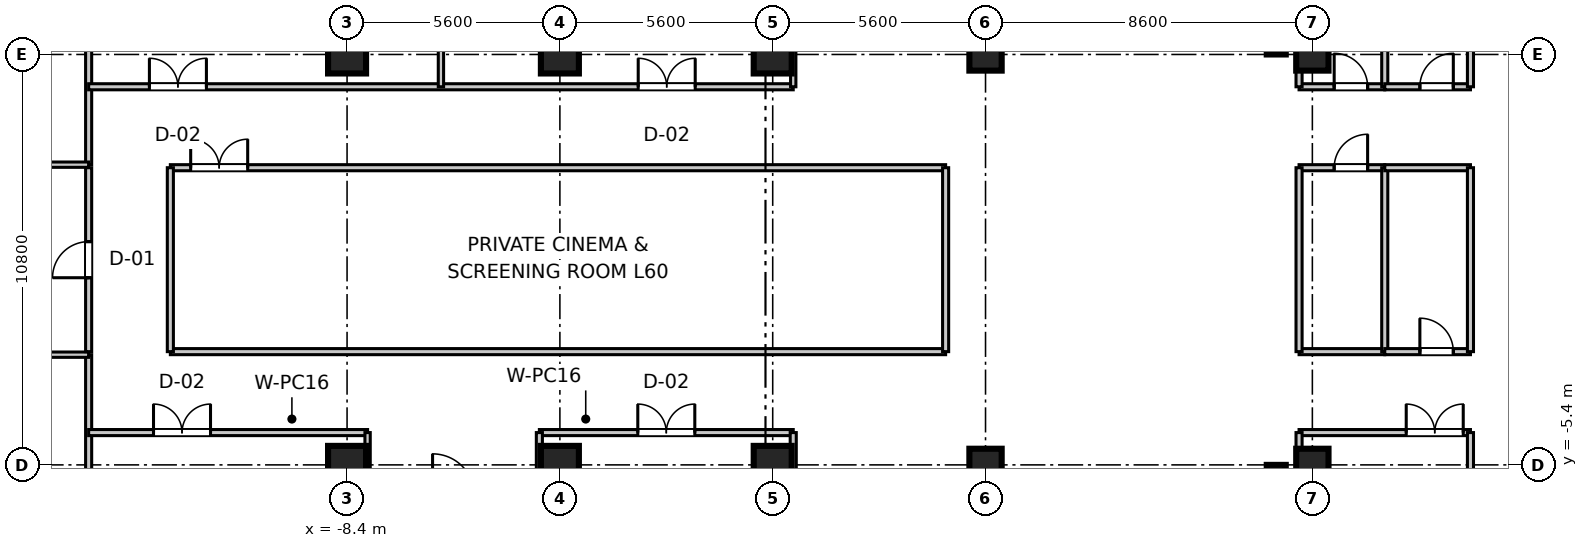
"""IFC4 building model, lengths in metres.
Left out: names, types, materials, properties, quantities, classifications, styles, units other than length and angle.
Written with IfcOpenShell. Run it as: python <this file> out.ifc"""

import sys

from ifc_helpers import new_model, si_unit, direction, frame, frame_2d, origin, origin_2d, place, context, subcontext, project, spatial, rectangle, extrude, source, transform, mapped, element, fill, save


model = new_model("IFC4")
c1 = context("Model", 3, precision=1e-05, world=origin(), true_north=direction((0.0, 1.0)))
c2 = subcontext(c1, "Body", "Model", "MODEL_VIEW")
j1 = project(units=[si_unit("LENGTHUNIT", "METRE"), si_unit("PLANEANGLEUNIT", "RADIAN")], contexts=[c1])
p1 = place(None, origin())
s1 = spatial("IfcSite", under=j1, at=p1, CompositionType="ELEMENT")
p2 = place(p1, origin())
s2 = spatial("IfcBuilding", under=s1, at=p2, CompositionType="ELEMENT")
p3 = place(p2, frame((0.0, 0.0, 234.5)))
s3 = spatial("IfcBuildingStorey", under=s2, at=p3, CompositionType="ELEMENT", Elevation=234.5)
m1 = source(origin(), c2, "Body", "SweptSolid", [
    extrude(rectangle(XDim=1.0, YDim=1.0, at=origin_2d()), origin(), (0.0, 0.0, 1.0), 3.655),
])
for number, where, z_axis, x_axis in (
    (1, (-8.4, -5.4, 0.0), (0.0, 0.0, 1.0), (1.0, 0.0, 0.0)),
    (2, (-8.4, 5.4, 0.0), (0.0, 0.0, 1.0), (1.0, 0.0, 0.0)),
    (3, (-2.8, -5.4, 0.0), (0.0, 0.0, 1.0), (1.0, 0.0, 0.0)),
    (4, (-2.8, 5.4, 0.0), (0.0, 0.0, 1.0), (1.0, 0.0, 0.0)),
    (5, (2.8, -5.4, 0.0), (0.0, 0.0, 1.0), (1.0, 0.0, 0.0)),
    (6, (2.8, 5.4, 0.0), (0.0, 0.0, 1.0), (1.0, 0.0, 0.0)),
):
    element("IfcColumn", number, at=place(p3, frame(where, z_axis=z_axis, x_axis=x_axis)), inside=s3, PredefinedType="COLUMN", context=c2, shape_type="MappedRepresentation", body=[
        mapped(m1, transform((0.0, 0.0, 0.0), scale=1.0)),
    ])
m2 = source(origin(), c2, "Body", "SweptSolid", [
    extrude(rectangle(XDim=0.85, YDim=0.85, at=origin_2d()), origin(), (0.0, 0.0, 1.0), 3.655),
])
for number, where, z_axis, x_axis in (
    (7, (8.4, -5.4, 0.0), (0.0, 0.0, 1.0), (1.0, 0.0, 0.0)),
    (8, (8.4, 5.4, 0.0), (0.0, 0.0, 1.0), (1.0, 0.0, 0.0)),
    (9, (17.0, -5.4, 0.0), (0.0, 0.0, 1.0), (1.0, 0.0, 0.0)),
    (10, (17.0, 5.4, 0.0), (0.0, 0.0, 1.0), (1.0, 0.0, 0.0)),
):
    element("IfcColumn", number, at=place(p3, frame(where, z_axis=z_axis, x_axis=x_axis)), inside=s3, PredefinedType="PILASTER", context=c2, shape_type="MappedRepresentation", body=[
        mapped(m2, transform((0.0, 0.0, 0.0), scale=1.0)),
    ])
m3 = source(origin(), c2, "Body", "SweptSolid", [
    extrude(rectangle(XDim=11.6, YDim=0.5, at=frame_2d((5.8, 0.0))), origin(), (0.0, 0.0, 1.0), 3.41),
])
for number, where, z_axis, x_axis in (
    (11, (16.05, 5.4, 0.0), (0.0, 0.0, 1.0), (0.0, 1.0, 0.0)),
    (12, (16.05, -17.0, 0.0), (0.0, 0.0, 1.0), (0.0, 1.0, 0.0)),
):
    element("IfcWall", number, at=place(p3, frame(where, z_axis=z_axis, x_axis=x_axis)), inside=s3, PredefinedType="SHEAR", context=c2, shape_type="MappedRepresentation", body=[
        mapped(m3, transform((0.0, 0.0, 0.0), scale=1.0)),
    ])
m4 = source(origin(), c2, "Body", "SweptSolid", [
    extrude(rectangle(XDim=2.255, YDim=0.16, at=frame_2d((1.127, 0.0))), origin(), (0.0, 0.0, 1.0), 2.75),
])
p4 = place(p3, frame((16.65, 4.55, 0.0), z_axis=(0.0, 0.0, 1.0), x_axis=(1.0, 0.0, 0.0)))
e13 = element("IfcWall", 13, at=p4, inside=s3, PredefinedType="PARTITIONING", context=c2, shape_type="MappedRepresentation", body=[
    mapped(m4, transform((0.0, 0.0, 0.0), scale=1.0)),
])
p5 = place(p4, frame((0.924, 0.0, 0.0)))
e14 = element("IfcOpeningElement", 14, at=p5, cuts=e13, PredefinedType="OPENING", context=c2, shape_type="SweptSolid", body=[
    extrude(rectangle(XDim=0.88, YDim=2.1, at=frame_2d((0.44, 1.05))), frame((0.0, 0.09, 0.0), z_axis=(0.0, -1.0, 0.0), x_axis=(1.0, 0.0, 0.0)), (0.0, 0.0, 1.0), 0.18),
])
m5 = source(origin(), c2, "Body", "SweptSolid", [
    extrude(rectangle(XDim=19.35, YDim=0.16, at=frame_2d((9.675, 0.0))), origin(), (0.0, 0.0, 1.0), 2.75),
])
for number, where, z_axis, x_axis in (
    (15, (16.65, 4.55, 0.0), (0.0, 0.0, 1.0), (0.0, 1.0, 0.0)),
    (16, (18.905, 4.55, 0.0), (0.0, 0.0, 1.0), (0.0, 1.0, 0.0)),
):
    element("IfcWall", number, at=place(p3, frame(where, z_axis=z_axis, x_axis=x_axis)), inside=s3, PredefinedType="PARTITIONING", context=c2, shape_type="MappedRepresentation", body=[
        mapped(m5, transform((0.0, 0.0, 0.0), scale=1.0)),
    ])
m6 = source(origin(), c2, "Body", "SweptSolid", [
    extrude(rectangle(XDim=2.255, YDim=0.16, at=frame_2d((1.127, 0.0))), origin(), (0.0, 0.0, 1.0), 2.75),
])
p6 = place(p3, frame((18.905, 4.55, 0.0), z_axis=(0.0, 0.0, 1.0), x_axis=(1.0, 0.0, 0.0)))
e17 = element("IfcWall", 17, at=p6, inside=s3, PredefinedType="PARTITIONING", context=c2, shape_type="MappedRepresentation", body=[
    mapped(m6, transform((0.0, 0.0, 0.0), scale=1.0)),
])
p7 = place(p6, frame((0.924, 0.0, 0.0)))
e18 = element("IfcOpeningElement", 18, at=p7, cuts=e17, PredefinedType="OPENING", context=c2, shape_type="SweptSolid", body=[
    extrude(rectangle(XDim=0.88, YDim=2.1, at=frame_2d((0.44, 1.05))), frame((0.0, 0.09, 0.0), z_axis=(0.0, -1.0, 0.0), x_axis=(1.0, 0.0, 0.0)), (0.0, 0.0, 1.0), 0.18),
])
m7 = source(origin(), c2, "Body", "SweptSolid", [
    extrude(rectangle(XDim=17.93, YDim=0.16, at=frame_2d((8.965, 0.0))), origin(), (0.0, 0.0, 1.0), 2.75),
])
p8 = place(p3, frame((21.16, 4.55, 0.0), z_axis=(0.0, 0.0, 1.0), x_axis=(0.0, 1.0, 0.0)))
e19 = element("IfcWall", 19, at=p8, inside=s3, PredefinedType="PARTITIONING", context=c2, shape_type="MappedRepresentation", body=[
    mapped(m7, transform((0.0, 0.0, 0.0), scale=1.0)),
])
m8 = source(origin(), c2, "Body", "SweptSolid", [
    extrude(rectangle(XDim=4.51, YDim=0.16, at=frame_2d((2.255, 0.0))), origin(), (0.0, 0.0, 1.0), 2.75),
])
p9 = place(p3, frame((16.65, -4.55, 0.0), z_axis=(0.0, 0.0, 1.0), x_axis=(1.0, 0.0, 0.0)))
e20 = element("IfcWall", 20, at=p9, inside=s3, PredefinedType="PARTITIONING", context=c2, shape_type="MappedRepresentation", body=[
    mapped(m8, transform((0.0, 0.0, 0.0), scale=1.0)),
])
p10 = place(p9, frame((2.82, 0.0, 0.0)))
e21 = element("IfcOpeningElement", 21, at=p10, cuts=e20, PredefinedType="OPENING", context=c2, shape_type="SweptSolid", body=[
    extrude(rectangle(XDim=1.5, YDim=2.15, at=frame_2d((0.75, 1.075))), frame((0.0, 0.09, 0.0), z_axis=(0.0, -1.0, 0.0), x_axis=(1.0, 0.0, 0.0)), (0.0, 0.0, 1.0), 0.18),
])
p11 = place(p3, frame((16.65, -23.9, 0.0), z_axis=(0.0, 0.0, 1.0), x_axis=(0.0, 1.0, 0.0)))
e22 = element("IfcWall", 22, at=p11, inside=s3, PredefinedType="PARTITIONING", context=c2, shape_type="MappedRepresentation", body=[
    mapped(m5, transform((0.0, 0.0, 0.0), scale=1.0)),
])
p12 = place(p3, frame((21.16, -22.48, 0.0), z_axis=(0.0, 0.0, 1.0), x_axis=(0.0, 1.0, 0.0)))
e23 = element("IfcWall", 23, at=p12, inside=s3, PredefinedType="PARTITIONING", context=c2, shape_type="MappedRepresentation", body=[
    mapped(m7, transform((0.0, 0.0, 0.0), scale=1.0)),
])
m9 = source(origin(), c2, "Body", "SweptSolid", [
    extrude(rectangle(XDim=21.4, YDim=0.16, at=frame_2d((10.7, 0.0))), origin(), (0.0, 0.0, 1.0), 2.75),
])
p13 = place(p3, frame((-15.2, 2.5, 0.0), z_axis=(0.0, 0.0, 1.0), x_axis=(0.0, 1.0, 0.0)))
e24 = element("IfcWall", 24, at=p13, inside=s3, PredefinedType="PARTITIONING", context=c2, shape_type="MappedRepresentation", body=[
    mapped(m9, transform((0.0, 0.0, 0.0), scale=1.0)),
])
p14 = place(p13, frame((8.15, 0.0, 0.0)))
e25 = element("IfcOpeningElement", 25, at=p14, cuts=e24, PredefinedType="OPENING", context=c2, shape_type="SweptSolid", body=[
    extrude(rectangle(XDim=0.95, YDim=2.1, at=frame_2d((0.475, 1.05))), frame((0.0, 0.09, 0.0), z_axis=(0.0, -1.0, 0.0), x_axis=(1.0, 0.0, 0.0)), (0.0, 0.0, 1.0), 0.18),
])
m10 = source(origin(), c2, "Body", "SweptSolid", [
    extrude(rectangle(XDim=5.96, YDim=0.14, at=frame_2d((2.98, 0.0))), origin(), (0.0, 0.0, 1.0), 2.75),
])
p15 = place(p3, frame((-21.16, 2.5, 0.0), z_axis=(0.0, 0.0, 1.0), x_axis=(1.0, 0.0, 0.0)))
e26 = element("IfcWall", 26, at=p15, inside=s3, PredefinedType="PARTITIONING", context=c2, shape_type="MappedRepresentation", body=[
    mapped(m10, transform((0.0, 0.0, 0.0), scale=1.0)),
])
m11 = source(origin(), c2, "Body", "SweptSolid", [
    extrude(rectangle(XDim=18.54, YDim=0.16, at=frame_2d((9.27, 0.0))), origin(), (0.0, 0.0, 1.0), 2.75),
])
p16 = place(p3, frame((-15.2, 4.55, 0.0), z_axis=(0.0, 0.0, 1.0), x_axis=(1.0, 0.0, 0.0)))
e27 = element("IfcWall", 27, at=p16, inside=s3, PredefinedType="PARTITIONING", context=c2, shape_type="MappedRepresentation", body=[
    mapped(m11, transform((0.0, 0.0, 0.0), scale=1.0)),
])
p17 = place(p16, frame((1.599, 0.0, 0.0)))
e28 = element("IfcOpeningElement", 28, at=p17, cuts=e27, PredefinedType="OPENING", context=c2, shape_type="SweptSolid", body=[
    extrude(rectangle(XDim=1.5, YDim=2.15, at=frame_2d((0.75, 1.075))), frame((0.0, 0.09, 0.0), z_axis=(0.0, -1.0, 0.0), x_axis=(1.0, 0.0, 0.0)), (0.0, 0.0, 1.0), 0.18),
])
p18 = place(p16, frame((14.461, 0.0, 0.0)))
e29 = element("IfcOpeningElement", 29, at=p18, cuts=e27, PredefinedType="OPENING", context=c2, shape_type="SweptSolid", body=[
    extrude(rectangle(XDim=1.5, YDim=2.15, at=frame_2d((0.75, 1.075))), frame((0.0, 0.09, 0.0), z_axis=(0.0, -1.0, 0.0), x_axis=(1.0, 0.0, 0.0)), (0.0, 0.0, 1.0), 0.18),
])
m12 = source(origin(), c2, "Body", "SweptSolid", [
    extrude(rectangle(XDim=19.35, YDim=0.14, at=frame_2d((9.675, 0.0))), origin(), (0.0, 0.0, 1.0), 2.75),
])
for number, where, z_axis, x_axis in (
    (30, (3.34, 4.55, 0.0), (0.0, 0.0, 1.0), (0.0, 1.0, 0.0)),
    (31, (-5.93, 4.55, 0.0), (0.0, 0.0, 1.0), (0.0, 1.0, 0.0)),
):
    element("IfcWall", number, at=place(p3, frame(where, z_axis=z_axis, x_axis=x_axis)), inside=s3, PredefinedType="PARTITIONING", context=c2, shape_type="MappedRepresentation", body=[
        mapped(m12, transform((0.0, 0.0, 0.0), scale=1.0)),
    ])
p19 = place(p3, frame((-15.2, -23.9, 0.0), z_axis=(0.0, 0.0, 1.0), x_axis=(0.0, 1.0, 0.0)))
e32 = element("IfcWall", 32, at=p19, inside=s3, PredefinedType="PARTITIONING", context=c2, shape_type="MappedRepresentation", body=[
    mapped(m9, transform((0.0, 0.0, 0.0), scale=1.0)),
])
p20 = place(p19, frame((12.3, 0.0, 0.0)))
e33 = element("IfcOpeningElement", 33, at=p20, cuts=e32, PredefinedType="OPENING", context=c2, shape_type="SweptSolid", body=[
    extrude(rectangle(XDim=0.95, YDim=2.1, at=frame_2d((0.475, 1.05))), frame((0.0, 0.09, 0.0), z_axis=(0.0, -1.0, 0.0), x_axis=(1.0, 0.0, 0.0)), (0.0, 0.0, 1.0), 0.18),
])
p21 = place(p3, frame((-21.16, -2.5, 0.0), z_axis=(0.0, 0.0, 1.0), x_axis=(1.0, 0.0, 0.0)))
e34 = element("IfcWall", 34, at=p21, inside=s3, PredefinedType="PARTITIONING", context=c2, shape_type="MappedRepresentation", body=[
    mapped(m10, transform((0.0, 0.0, 0.0), scale=1.0)),
])
m13 = source(origin(), c2, "Body", "SweptSolid", [
    extrude(rectangle(XDim=7.34, YDim=0.16, at=frame_2d((3.67, 0.0))), origin(), (0.0, 0.0, 1.0), 2.75),
])
p22 = place(p3, frame((-15.2, -4.55, 0.0), z_axis=(0.0, 0.0, 1.0), x_axis=(1.0, 0.0, 0.0)))
e35 = element("IfcWall", 35, at=p22, inside=s3, PredefinedType="PARTITIONING", context=c2, shape_type="MappedRepresentation", body=[
    mapped(m13, transform((0.0, 0.0, 0.0), scale=1.0)),
])
p23 = place(p22, frame((1.707, 0.0, 0.0)))
e36 = element("IfcOpeningElement", 36, at=p23, cuts=e35, PredefinedType="OPENING", context=c2, shape_type="SweptSolid", body=[
    extrude(rectangle(XDim=1.5, YDim=2.15, at=frame_2d((0.75, 1.075))), frame((0.0, 0.09, 0.0), z_axis=(0.0, -1.0, 0.0), x_axis=(1.0, 0.0, 0.0)), (0.0, 0.0, 1.0), 0.18),
])
p24 = place(p3, frame((-7.86, -23.9, 0.0), z_axis=(0.0, 0.0, 1.0), x_axis=(0.0, 1.0, 0.0)))
e37 = element("IfcWall", 37, at=p24, inside=s3, PredefinedType="PARTITIONING", context=c2, shape_type="MappedRepresentation", body=[
    mapped(m12, transform((0.0, 0.0, 0.0), scale=1.0)),
])
m14 = source(origin(), c2, "Body", "SweptSolid", [
    extrude(rectangle(XDim=6.68, YDim=0.16, at=frame_2d((3.34, 0.0))), origin(), (0.0, 0.0, 1.0), 2.75),
])
p25 = place(p3, frame((-3.34, -4.55, 0.0), z_axis=(0.0, 0.0, 1.0), x_axis=(1.0, 0.0, 0.0)))
e38 = element("IfcWall", 38, at=p25, inside=s3, PredefinedType="PARTITIONING", context=c2, shape_type="MappedRepresentation", body=[
    mapped(m14, transform((0.0, 0.0, 0.0), scale=1.0)),
])
p26 = place(p25, frame((2.59, 0.0, 0.0)))
e39 = element("IfcOpeningElement", 39, at=p26, cuts=e38, PredefinedType="OPENING", context=c2, shape_type="SweptSolid", body=[
    extrude(rectangle(XDim=1.5, YDim=2.15, at=frame_2d((0.75, 1.075))), frame((0.0, 0.09, 0.0), z_axis=(0.0, -1.0, 0.0), x_axis=(1.0, 0.0, 0.0)), (0.0, 0.0, 1.0), 0.18),
])
for number, where, z_axis, x_axis in (
    (40, (-3.34, -23.9, 0.0), (0.0, 0.0, 1.0), (0.0, 1.0, 0.0)),
    (41, (3.34, -23.9, 0.0), (0.0, 0.0, 1.0), (0.0, 1.0, 0.0)),
):
    element("IfcWall", number, at=place(p3, frame(where, z_axis=z_axis, x_axis=x_axis)), inside=s3, PredefinedType="PARTITIONING", context=c2, shape_type="MappedRepresentation", body=[
        mapped(m5, transform((0.0, 0.0, 0.0), scale=1.0)),
    ])
m15 = source(origin(), c2, "Body", "SweptSolid", [
    extrude(rectangle(XDim=4.84, YDim=0.16, at=frame_2d((2.42, 0.0))), origin(), (0.0, 0.0, 1.0), 2.75),
])
p27 = place(p3, frame((-15.2, -2.42, 0.0), z_axis=(0.0, 0.0, 1.0), x_axis=(0.0, 1.0, 0.0)))
e42 = element("IfcWall", 42, at=p27, inside=s3, PredefinedType="PARTITIONING", context=c2, shape_type="MappedRepresentation", body=[
    mapped(m15, transform((0.0, 0.0, 0.0), scale=1.0)),
])
p28 = place(p27, frame((1.945, 0.0, 0.0)))
e43 = element("IfcOpeningElement", 43, at=p28, cuts=e42, PredefinedType="OPENING", context=c2, shape_type="SweptSolid", body=[
    extrude(rectangle(XDim=0.95, YDim=2.1, at=frame_2d((0.475, 1.05))), frame((0.0, 0.09, 0.0), z_axis=(0.0, -1.0, 0.0), x_axis=(1.0, 0.0, 0.0)), (0.0, 0.0, 1.0), 0.18),
])
m16 = source(origin(), c2, "Body", "SweptSolid", [
    extrude(rectangle(XDim=20.4, YDim=0.16, at=frame_2d((10.2, 0.0))), origin(), (0.0, 0.0, 1.0), 2.75),
])
p29 = place(p3, frame((-13.05, -2.42, 0.0), z_axis=(0.0, 0.0, 1.0), x_axis=(1.0, 0.0, 0.0)))
e44 = element("IfcWall", 44, at=p29, inside=s3, PredefinedType="PARTITIONING", context=c2, shape_type="MappedRepresentation", body=[
    mapped(m16, transform((0.0, 0.0, 0.0), scale=1.0)),
])
p30 = place(p3, frame((-13.05, 2.42, 0.0), z_axis=(0.0, 0.0, 1.0), x_axis=(1.0, 0.0, 0.0)))
e45 = element("IfcWall", 45, at=p30, inside=s3, PredefinedType="PARTITIONING", context=c2, shape_type="MappedRepresentation", body=[
    mapped(m16, transform((0.0, 0.0, 0.0), scale=1.0)),
])
p31 = place(p30, frame((0.535, 0.0, 0.0)))
e46 = element("IfcOpeningElement", 46, at=p31, cuts=e45, PredefinedType="OPENING", context=c2, shape_type="SweptSolid", body=[
    extrude(rectangle(XDim=1.5, YDim=2.15, at=frame_2d((0.75, 1.075))), frame((0.0, 0.09, 0.0), z_axis=(0.0, -1.0, 0.0), x_axis=(1.0, 0.0, 0.0)), (0.0, 0.0, 1.0), 0.18),
])
for number, where, z_axis, x_axis in (
    (47, (-13.05, -2.42, 0.0), (0.0, 0.0, 1.0), (0.0, 1.0, 0.0)),
    (48, (7.35, -2.42, 0.0), (0.0, 0.0, 1.0), (0.0, 1.0, 0.0)),
):
    element("IfcWall", number, at=place(p3, frame(where, z_axis=z_axis, x_axis=x_axis)), inside=s3, PredefinedType="PARTITIONING", context=c2, shape_type="MappedRepresentation", body=[
        mapped(m15, transform((0.0, 0.0, 0.0), scale=1.0)),
    ])
p32 = place(p3, frame((16.65, -2.42, 0.0), z_axis=(0.0, 0.0, 1.0), x_axis=(1.0, 0.0, 0.0)))
e49 = element("IfcWall", 49, at=p32, inside=s3, PredefinedType="PARTITIONING", context=c2, shape_type="MappedRepresentation", body=[
    mapped(m4, transform((0.0, 0.0, 0.0), scale=1.0)),
])
p33 = place(p3, frame((16.65, 2.42, 0.0), z_axis=(0.0, 0.0, 1.0), x_axis=(1.0, 0.0, 0.0)))
e50 = element("IfcWall", 50, at=p33, inside=s3, PredefinedType="PARTITIONING", context=c2, shape_type="MappedRepresentation", body=[
    mapped(m4, transform((0.0, 0.0, 0.0), scale=1.0)),
])
p34 = place(p33, frame((0.924, 0.0, 0.0)))
e51 = element("IfcOpeningElement", 51, at=p34, cuts=e50, PredefinedType="OPENING", context=c2, shape_type="SweptSolid", body=[
    extrude(rectangle(XDim=0.88, YDim=2.1, at=frame_2d((0.44, 1.05))), frame((0.0, 0.09, 0.0), z_axis=(0.0, -1.0, 0.0), x_axis=(1.0, 0.0, 0.0)), (0.0, 0.0, 1.0), 0.18),
])
for number, where, z_axis, x_axis in (
    (52, (16.65, -2.42, 0.0), (0.0, 0.0, 1.0), (0.0, 1.0, 0.0)),
    (53, (18.905, -2.42, 0.0), (0.0, 0.0, 1.0), (0.0, 1.0, 0.0)),
):
    element("IfcWall", number, at=place(p3, frame(where, z_axis=z_axis, x_axis=x_axis)), inside=s3, PredefinedType="PARTITIONING", context=c2, shape_type="MappedRepresentation", body=[
        mapped(m15, transform((0.0, 0.0, 0.0), scale=1.0)),
    ])
p35 = place(p3, frame((18.905, -2.42, 0.0), z_axis=(0.0, 0.0, 1.0), x_axis=(1.0, 0.0, 0.0)))
e54 = element("IfcWall", 54, at=p35, inside=s3, PredefinedType="PARTITIONING", context=c2, shape_type="MappedRepresentation", body=[
    mapped(m6, transform((0.0, 0.0, 0.0), scale=1.0)),
])
p36 = place(p35, frame((0.924, 0.0, 0.0)))
e55 = element("IfcOpeningElement", 55, at=p36, cuts=e54, PredefinedType="OPENING", context=c2, shape_type="SweptSolid", body=[
    extrude(rectangle(XDim=0.88, YDim=2.1, at=frame_2d((0.44, 1.05))), frame((0.0, 0.09, 0.0), z_axis=(0.0, -1.0, 0.0), x_axis=(1.0, 0.0, 0.0)), (0.0, 0.0, 1.0), 0.18),
])
p37 = place(p3, frame((18.905, 2.42, 0.0), z_axis=(0.0, 0.0, 1.0), x_axis=(1.0, 0.0, 0.0)))
e56 = element("IfcWall", 56, at=p37, inside=s3, PredefinedType="PARTITIONING", context=c2, shape_type="MappedRepresentation", body=[
    mapped(m6, transform((0.0, 0.0, 0.0), scale=1.0)),
])
p38 = place(p3, frame((21.16, -2.42, 0.0), z_axis=(0.0, 0.0, 1.0), x_axis=(0.0, 1.0, 0.0)))
e57 = element("IfcWall", 57, at=p38, inside=s3, PredefinedType="PARTITIONING", context=c2, shape_type="MappedRepresentation", body=[
    mapped(m15, transform((0.0, 0.0, 0.0), scale=1.0)),
])
m17 = source(origin(), c2, "Body", "SweptSolid", [
    extrude(rectangle(XDim=0.88, YDim=2.1, at=frame_2d((0.44, 1.05))), frame((0.0, 0.025, 0.0), z_axis=(0.0, -1.0, 0.0), x_axis=(1.0, 0.0, 0.0)), (0.0, 0.0, 1.0), 0.05),
])
p39 = place(p5, origin())
e58 = element("IfcDoor", 58, at=p39, inside=s3, OperationType="SINGLE_SWING_LEFT", PredefinedType="DOOR", context=c2, shape_type="MappedRepresentation", body=[
    mapped(m17, transform((0.0, 0.0, 0.0), scale=1.0)),
])
fill(e14, e58)
p40 = place(p7, origin())
e59 = element("IfcDoor", 59, at=p40, inside=s3, OperationType="SINGLE_SWING_RIGHT", PredefinedType="DOOR", context=c2, shape_type="MappedRepresentation", body=[
    mapped(m17, transform((0.0, 0.0, 0.0), scale=1.0)),
])
fill(e18, e59)
m18 = source(origin(), c2, "Body", "SweptSolid", [
    extrude(rectangle(XDim=1.5, YDim=2.15, at=frame_2d((0.75, 1.075))), frame((0.0, 0.025, 0.0), z_axis=(0.0, -1.0, 0.0), x_axis=(1.0, 0.0, 0.0)), (0.0, 0.0, 1.0), 0.05),
])
p41 = place(p10, frame((1.5, 0.0, 0.0), z_axis=(0.0, 0.0, 1.0), x_axis=(-1.0, 0.0, 0.0)))
e60 = element("IfcDoor", 60, at=p41, inside=s3, OperationType="DOUBLE_DOOR_SINGLE_SWING", PredefinedType="DOOR", context=c2, shape_type="MappedRepresentation", body=[
    mapped(m18, transform((0.0, 0.0, 0.0), scale=1.0)),
])
fill(e21, e60)
p42 = place(p17, origin())
e61 = element("IfcDoor", 61, at=p42, inside=s3, OperationType="DOUBLE_DOOR_SINGLE_SWING", PredefinedType="DOOR", context=c2, shape_type="MappedRepresentation", body=[
    mapped(m18, transform((0.0, 0.0, 0.0), scale=1.0)),
])
fill(e28, e61)
p43 = place(p18, origin())
e62 = element("IfcDoor", 62, at=p43, inside=s3, OperationType="DOUBLE_DOOR_SINGLE_SWING", PredefinedType="DOOR", context=c2, shape_type="MappedRepresentation", body=[
    mapped(m18, transform((0.0, 0.0, 0.0), scale=1.0)),
])
fill(e29, e62)
p44 = place(p23, frame((1.5, 0.0, 0.0), z_axis=(0.0, 0.0, 1.0), x_axis=(-1.0, 0.0, 0.0)))
e63 = element("IfcDoor", 63, at=p44, inside=s3, OperationType="DOUBLE_DOOR_SINGLE_SWING", PredefinedType="DOOR", context=c2, shape_type="MappedRepresentation", body=[
    mapped(m18, transform((0.0, 0.0, 0.0), scale=1.0)),
])
fill(e36, e63)
p45 = place(p26, frame((1.5, 0.0, 0.0), z_axis=(0.0, 0.0, 1.0), x_axis=(-1.0, 0.0, 0.0)))
e64 = element("IfcDoor", 64, at=p45, inside=s3, OperationType="DOUBLE_DOOR_SINGLE_SWING", PredefinedType="DOOR", context=c2, shape_type="MappedRepresentation", body=[
    mapped(m18, transform((0.0, 0.0, 0.0), scale=1.0)),
])
fill(e39, e64)
m19 = source(origin(), c2, "Body", "SweptSolid", [
    extrude(rectangle(XDim=0.95, YDim=2.1, at=frame_2d((0.475, 1.05))), frame((0.0, 0.025, 0.0), z_axis=(0.0, -1.0, 0.0), x_axis=(1.0, 0.0, 0.0)), (0.0, 0.0, 1.0), 0.05),
])
p46 = place(p28, origin())
e65 = element("IfcDoor", 65, at=p46, inside=s3, OperationType="SINGLE_SWING_LEFT", PredefinedType="DOOR", context=c2, shape_type="MappedRepresentation", body=[
    mapped(m19, transform((0.0, 0.0, 0.0), scale=1.0)),
])
fill(e43, e65)
p47 = place(p31, frame((1.5, 0.0, 0.0), z_axis=(0.0, 0.0, 1.0), x_axis=(-1.0, 0.0, 0.0)))
e66 = element("IfcDoor", 66, at=p47, inside=s3, OperationType="DOUBLE_DOOR_SINGLE_SWING", PredefinedType="DOOR", context=c2, shape_type="MappedRepresentation", body=[
    mapped(m18, transform((0.0, 0.0, 0.0), scale=1.0)),
])
fill(e46, e66)
p48 = place(p34, frame((0.88, 0.0, 0.0), z_axis=(0.0, 0.0, 1.0), x_axis=(-1.0, 0.0, 0.0)))
e67 = element("IfcDoor", 67, at=p48, inside=s3, OperationType="SINGLE_SWING_RIGHT", PredefinedType="DOOR", context=c2, shape_type="MappedRepresentation", body=[
    mapped(m17, transform((0.0, 0.0, 0.0), scale=1.0)),
])
fill(e51, e67)
p49 = place(p36, origin())
e68 = element("IfcDoor", 68, at=p49, inside=s3, OperationType="SINGLE_SWING_LEFT", PredefinedType="DOOR", context=c2, shape_type="MappedRepresentation", body=[
    mapped(m17, transform((0.0, 0.0, 0.0), scale=1.0)),
])
fill(e55, e68)
save(model, sys.argv[1])
